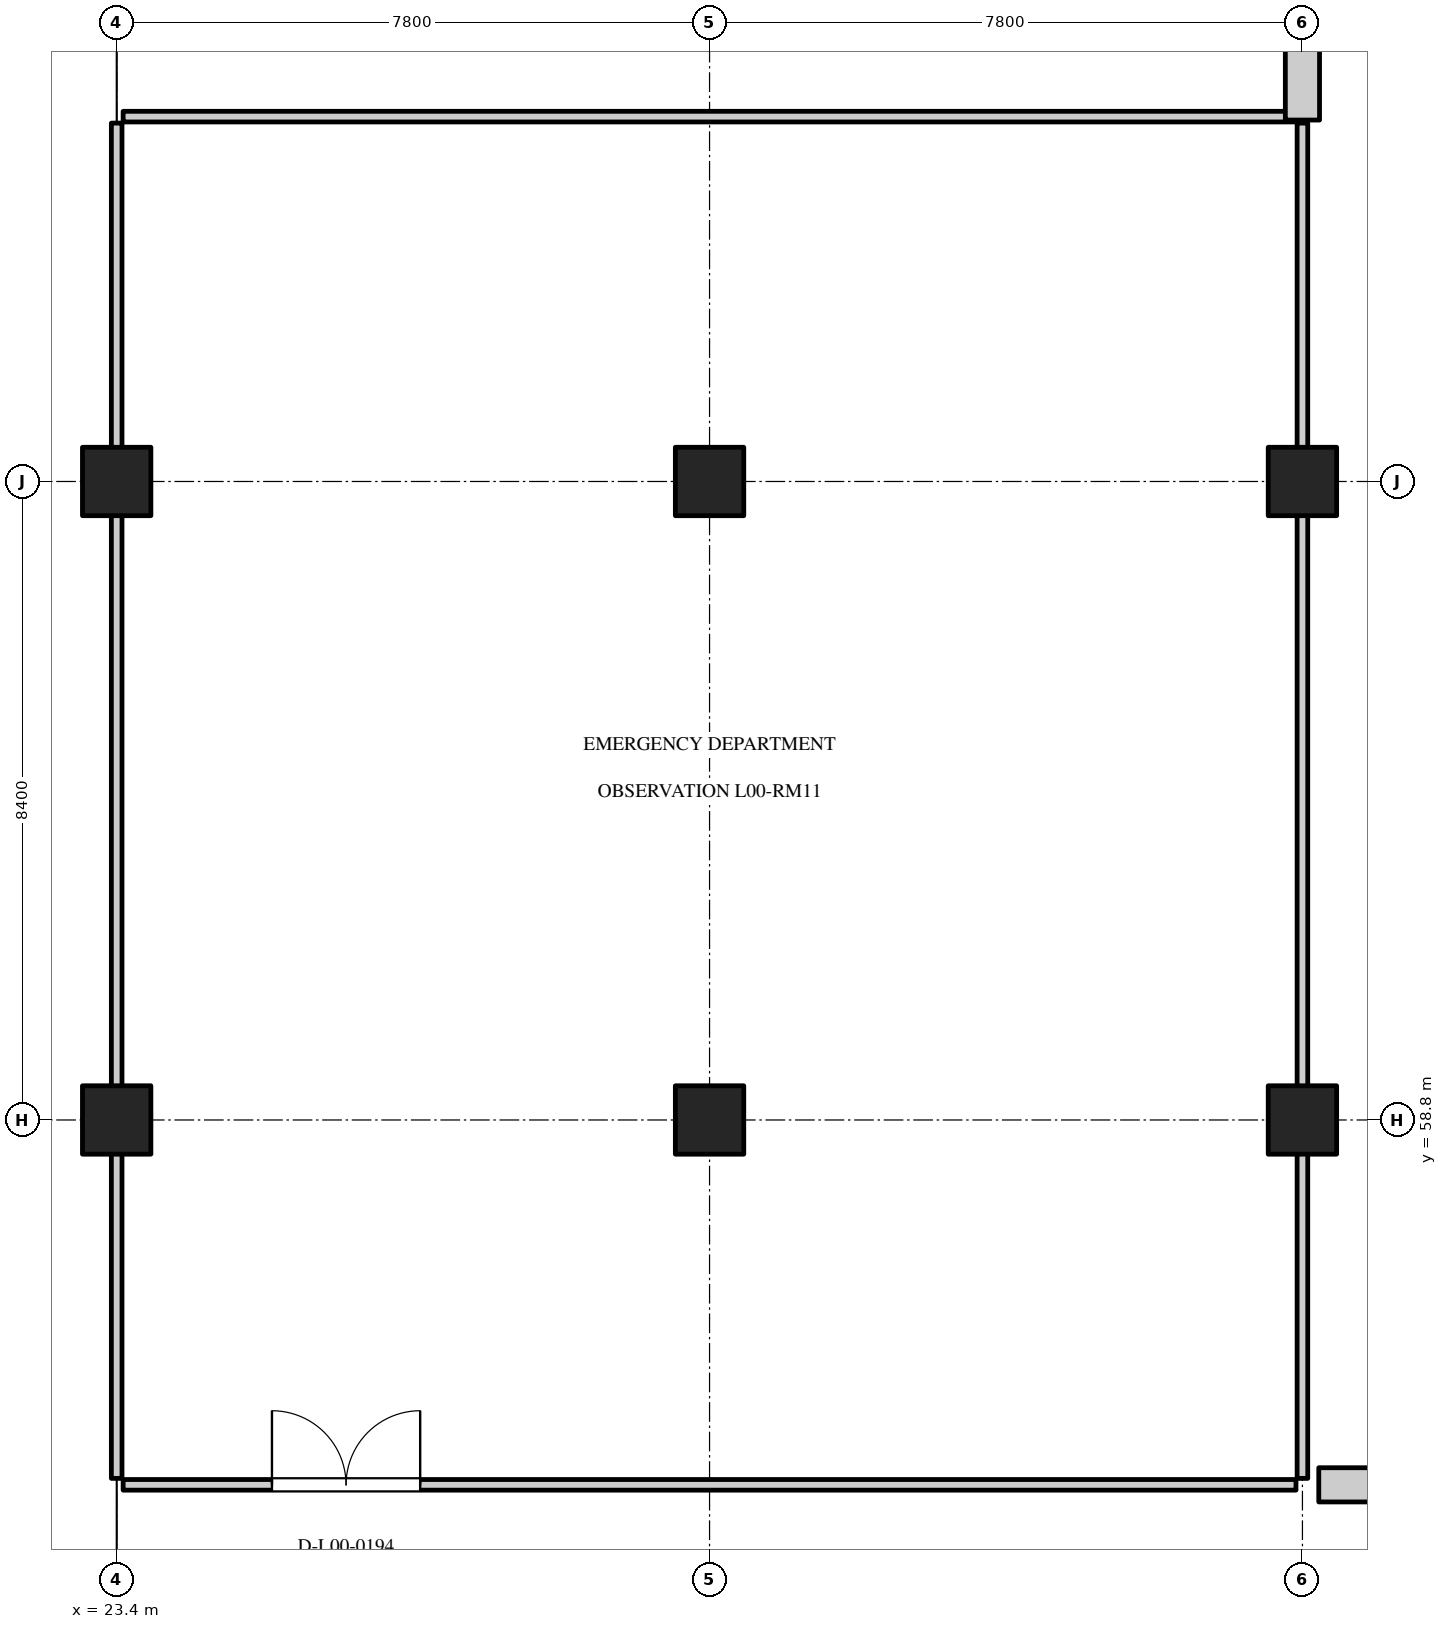
"""IFC4 building model, lengths in metres.
Left out: names, types, materials, properties, quantities, classifications, styles, units other than length and angle.
Written with IfcOpenShell. Run it as: python <this file> out.ifc"""

import sys

from ifc_helpers import new_model, si_unit, direction, frame, frame_2d, origin, origin_2d, place, context, subcontext, project, spatial, rectangle, extrude, element, fill, save


model = new_model("IFC4")
c1 = context("Model", 3, precision=1e-05, world=origin(), true_north=direction((0.0, 1.0)))
c2 = subcontext(c1, "Body", "Model", "MODEL_VIEW")
j1 = project(units=[si_unit("LENGTHUNIT", "METRE"), si_unit("PLANEANGLEUNIT", "RADIAN")], contexts=[c1])
p1 = place(None, origin())
s1 = spatial("IfcSite", under=j1, at=p1, CompositionType="ELEMENT")
p2 = place(p1, origin())
s2 = spatial("IfcBuilding", under=s1, at=p2, CompositionType="ELEMENT")
p3 = place(p2, origin())
s3 = spatial("IfcBuildingStorey", under=s2, at=p3, CompositionType="ELEMENT", Elevation=0.0)
for number, where, z_axis, x_axis in (
    (1, (23.4, 58.8, 0.0), (0.0, 0.0, 1.0), (1.0, 0.0, 0.0)),
    (2, (23.4, 67.2, 0.0), (0.0, 0.0, 1.0), (1.0, 0.0, 0.0)),
    (3, (31.2, 58.8, 0.0), (0.0, 0.0, 1.0), (1.0, 0.0, 0.0)),
    (4, (31.2, 67.2, 0.0), (0.0, 0.0, 1.0), (1.0, 0.0, 0.0)),
    (5, (39.0, 58.8, 0.0), (0.0, 0.0, 1.0), (1.0, 0.0, 0.0)),
    (6, (39.0, 67.2, 0.0), (0.0, 0.0, 1.0), (1.0, 0.0, 0.0)),
):
    element("IfcColumn", number, at=place(p3, frame(where, z_axis=z_axis, x_axis=x_axis)), inside=s3, PredefinedType="COLUMN", context=c2, shape_type="SweptSolid", body=[
        extrude(rectangle(XDim=0.9, YDim=0.9, at=origin_2d()), origin(), (0.0, 0.0, 1.0), 4.8),
    ])
p4 = place(p3, frame((23.485, 54.0, 0.0), z_axis=(0.0, 0.0, 1.0), x_axis=(1.0, 0.0, 0.0)))
e7 = element("IfcWall", 7, at=p4, inside=s3, PredefinedType="PARTITIONING", context=c2, shape_type="SweptSolid", body=[
    extrude(rectangle(XDim=15.43, YDim=0.14, at=frame_2d((7.715, 0.0))), origin(), (0.0, 0.0, 1.0), 4.43),
])
p5 = place(p4, frame((1.958, 0.0, 0.0)))
e8 = element("IfcOpeningElement", 8, at=p5, cuts=e7, PredefinedType="OPENING", context=c2, shape_type="SweptSolid", body=[
    extrude(rectangle(XDim=1.95, YDim=2.35, at=frame_2d((0.975, 1.175))), frame((0.0, 0.082, 0.0), z_axis=(0.0, -1.0, 0.0), x_axis=(1.0, 0.0, 0.0)), (0.0, 0.0, 1.0), 0.164),
])
p6 = place(p3, frame((23.485, 72.0, 0.0), z_axis=(0.0, 0.0, 1.0), x_axis=(1.0, 0.0, 0.0)))
e9 = element("IfcWall", 9, at=p6, inside=s3, PredefinedType="PARTITIONING", context=c2, shape_type="SweptSolid", body=[
    extrude(rectangle(XDim=15.43, YDim=0.14, at=frame_2d((7.715, 0.0))), origin(), (0.0, 0.0, 1.0), 4.43),
])
for number, where, z_axis, x_axis in (
    (10, (23.4, 54.085, 0.0), (0.0, 0.0, 1.0), (0.0, 1.0, 0.0)),
    (11, (39.0, 54.085, 0.0), (0.0, 0.0, 1.0), (0.0, 1.0, 0.0)),
):
    element("IfcWall", number, at=place(p3, frame(where, z_axis=z_axis, x_axis=x_axis)), inside=s3, PredefinedType="PARTITIONING", context=c2, shape_type="SweptSolid", body=[
        extrude(rectangle(XDim=17.83, YDim=0.14, at=frame_2d((8.915, 0.0))), origin(), (0.0, 0.0, 1.0), 3.7),
    ])
p7 = place(p3, frame((39.215, 54.0, 0.0), z_axis=(0.0, 0.0, 1.0), x_axis=(1.0, 0.0, 0.0)))
e12 = element("IfcWall", 12, at=p7, inside=s3, PredefinedType="STANDARD", context=c2, shape_type="SweptSolid", body=[
    extrude(rectangle(XDim=15.17, YDim=0.45, at=frame_2d((7.585, 0.0))), origin(), (0.0, 0.0, 1.0), 4.43),
])
p8 = place(p7, frame((1.99, 0.0, 0.0)))
e13 = element("IfcOpeningElement", 13, at=p8, cuts=e12, PredefinedType="OPENING", context=c2, shape_type="SweptSolid", body=[
    extrude(rectangle(XDim=1.2, YDim=2.15, at=frame_2d((0.6, 1.075))), frame((0.0, 0.237, 0.0), z_axis=(0.0, -1.0, 0.0), x_axis=(1.0, 0.0, 0.0)), (0.0, 0.0, 1.0), 0.474),
])
p9 = place(p3, frame((39.0, 71.955, 0.0), z_axis=(0.0, 0.0, 1.0), x_axis=(0.0, 1.0, 0.0)))
e14 = element("IfcWall", 14, at=p9, inside=s3, PredefinedType="STANDARD", context=c2, shape_type="SweptSolid", body=[
    extrude(rectangle(XDim=3.43, YDim=0.45, at=frame_2d((1.715, 0.0))), origin(), (0.0, 0.0, 1.0), 3.7),
])
p10 = place(p5, origin())
e15 = element("IfcDoor", 15, at=p10, inside=s3, OperationType="DOUBLE_DOOR_SINGLE_SWING", PredefinedType="DOOR", context=c2, shape_type="SweptSolid", body=[
    extrude(rectangle(XDim=1.95, YDim=2.35, at=frame_2d((0.975, 1.175))), frame((0.0, 0.025, 0.0), z_axis=(0.0, -1.0, 0.0), x_axis=(1.0, 0.0, 0.0)), (0.0, 0.0, 1.0), 0.05),
])
fill(e8, e15)
save(model, sys.argv[1])
